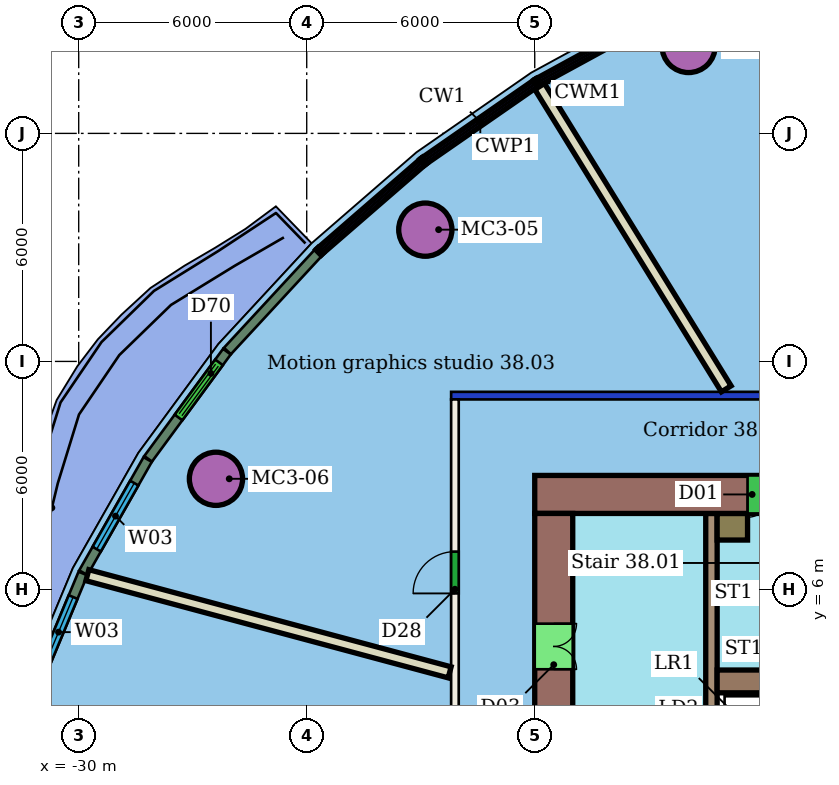
"""IFC4 building model, lengths in metres.
Left out: names, types, materials, properties, quantities, classifications, styles, units other than length and angle.
Written with IfcOpenShell. Run it as: python <this file> out.ifc"""

import sys

from ifc_helpers import new_model, si_unit, direction, frame, frame_2d, origin, origin_2d, place, context, subcontext, project, spatial, rectangle, hollow_circle, extrude, element, fill, save


model = new_model("IFC4")
c1 = context("Model", 3, precision=1e-05, world=origin(), true_north=direction((0.0, 1.0)))
c2 = subcontext(c1, "Body", "Model", "MODEL_VIEW")
j1 = project(units=[si_unit("LENGTHUNIT", "METRE"), si_unit("PLANEANGLEUNIT", "RADIAN")], contexts=[c1])
p1 = place(None, origin())
s1 = spatial("IfcSite", under=j1, at=p1, CompositionType="ELEMENT")
p2 = place(p1, origin())
s2 = spatial("IfcBuilding", under=s1, at=p2, CompositionType="ELEMENT")
p3 = place(p2, frame((0.0, 0.0, 161.4)))
s3 = spatial("IfcBuildingStorey", under=s2, at=p3, CompositionType="ELEMENT", Elevation=161.4)
for number, where, z_axis, x_axis in (
    (1, (-13.952, 20.301, 0.0), (0.0, 0.0, 1.0), (1.0, 0.0, 0.0)),
    (2, (-20.879, 15.467, 0.0), (0.0, 0.0, 1.0), (1.0, 0.0, 0.0)),
    (3, (-26.388, 8.912, 0.0), (0.0, 0.0, 1.0), (1.0, 0.0, 0.0)),
):
    element("IfcColumn", number, at=place(p3, frame(where, z_axis=z_axis, x_axis=x_axis)), inside=s3, PredefinedType="COLUMN", context=c2, shape_type="SweptSolid", body=[
        extrude(hollow_circle(Radius=0.7, WallThickness=0.05, at=origin_2d()), origin(), (0.0, 0.0, 1.0), 3.45),
    ])
p4 = place(p3, frame((-20.1, -11.0, 0.0), z_axis=(0.0, 0.0, 1.0), x_axis=(0.0, 1.0, 0.0)))
e4 = element("IfcWall", 4, at=p4, inside=s3, PredefinedType="PARTITIONING", context=c2, shape_type="SweptSolid", body=[
    extrude(rectangle(XDim=22.0, YDim=0.2, at=frame_2d((11.0, 0.0))), origin(), (0.0, 0.0, 1.0), 3.45),
])
p5 = place(p4, frame((16.896, 0.0, 0.0)))
e5 = element("IfcOpeningElement", 5, at=p5, cuts=e4, PredefinedType="OPENING", context=c2, shape_type="SweptSolid", body=[
    extrude(rectangle(XDim=1.1, YDim=2.1, at=frame_2d((0.55, 1.05))), frame((0.0, 0.11, 0.0), z_axis=(0.0, -1.0, 0.0), x_axis=(1.0, 0.0, 0.0)), (0.0, 0.0, 1.0), 0.22),
])
p6 = place(p4, frame((10.168, 0.0, 0.0)))
e6 = element("IfcOpeningElement", 6, at=p6, cuts=e4, PredefinedType="OPENING", context=c2, shape_type="SweptSolid", body=[
    extrude(rectangle(XDim=1.8, YDim=2.1, at=frame_2d((0.9, 1.05))), frame((0.0, 0.11, 0.0), z_axis=(0.0, -1.0, 0.0), x_axis=(1.0, 0.0, 0.0)), (0.0, 0.0, 1.0), 0.22),
])
p7 = place(p3, frame((-20.2, 11.1, 0.0), z_axis=(0.0, 0.0, 1.0), x_axis=(1.0, 0.0, 0.0)))
e7 = element("IfcWall", 7, at=p7, inside=s3, PredefinedType="PARTITIONING", context=c2, shape_type="SweptSolid", body=[
    extrude(rectangle(XDim=28.4, YDim=0.2, at=frame_2d((14.2, 0.0))), origin(), (0.0, 0.0, 1.0), 3.05),
])
p8 = place(p7, frame((20.771, 0.0, 0.0)))
e8 = element("IfcOpeningElement", 8, at=p8, cuts=e7, PredefinedType="OPENING", context=c2, shape_type="SweptSolid", body=[
    extrude(rectangle(XDim=0.9, YDim=2.1, at=frame_2d((0.45, 1.05))), frame((0.0, 0.11, 0.0), z_axis=(0.0, -1.0, 0.0), x_axis=(1.0, 0.0, 0.0)), (0.0, 0.0, 1.0), 0.22),
])
p9 = place(p7, frame((14.548, 0.0, 0.0)))
e9 = element("IfcOpeningElement", 9, at=p9, cuts=e7, PredefinedType="OPENING", context=c2, shape_type="SweptSolid", body=[
    extrude(rectangle(XDim=1.8, YDim=2.1, at=frame_2d((0.9, 1.05))), frame((0.0, 0.11, 0.0), z_axis=(0.0, -1.0, 0.0), x_axis=(1.0, 0.0, 0.0)), (0.0, 0.0, 1.0), 0.22),
])
p10 = place(p3, frame((-17.871, 19.235, 0.0), z_axis=(0.0, 0.0, 1.0), x_axis=(0.525169292987, -0.850997775381, 0.0)))
e10 = element("IfcWall", 10, at=p10, inside=s3, PredefinedType="PARTITIONING", context=c2, shape_type="SweptSolid", body=[
    extrude(rectangle(XDim=9.35, YDim=0.3, at=frame_2d((4.675, 0.0))), origin(), (0.0, 0.0, 1.0), 3.45),
])
p11 = place(p3, frame((-29.772, 6.375, 0.0), z_axis=(0.0, 0.0, 1.0), x_axis=(0.965867747251, -0.259035701826, 0.0)))
e11 = element("IfcWall", 11, at=p11, inside=s3, PredefinedType="PARTITIONING", context=c2, shape_type="SweptSolid", body=[
    extrude(rectangle(XDim=9.87, YDim=0.3, at=frame_2d((4.935, 0.0))), origin(), (0.0, 0.0, 1.0), 3.45),
])
p12 = place(p3, frame((-23.7, 14.854, 0.0), z_axis=(0.0, 0.0, 1.0), x_axis=(-0.679128099516, -0.734019771156, 0.0)))
e12 = element("IfcWall", 12, at=p12, inside=s3, PredefinedType="SOLIDWALL", context=c2, shape_type="SweptSolid", body=[
    extrude(rectangle(XDim=3.514, YDim=0.25, at=frame_2d((1.757, 0.0))), origin(), (0.0, 0.0, 1.0), 3.1),
])
p13 = place(p3, frame((-26.101, 12.257, 0.0), z_axis=(0.0, 0.0, 1.0), x_axis=(-0.592246582395, -0.805756778216, 0.0)))
e13 = element("IfcWall", 13, at=p13, inside=s3, PredefinedType="SOLIDWALL", context=c2, shape_type="SweptSolid", body=[
    extrude(rectangle(XDim=3.499, YDim=0.25, at=frame_2d((1.75, 0.0))), origin(), (0.0, 0.0, 1.0), 3.1),
])
p14 = place(p13, frame((0.35, 0.0, 0.0)))
e14 = element("IfcOpeningElement", 14, at=p14, cuts=e13, PredefinedType="OPENING", context=c2, shape_type="SweptSolid", body=[
    extrude(rectangle(XDim=1.8, YDim=2.4, at=frame_2d((0.9, 1.2))), frame((0.0, 0.135, 0.0), z_axis=(0.0, -1.0, 0.0), x_axis=(1.0, 0.0, 0.0)), (0.0, 0.0, 1.0), 0.27),
])
p15 = place(p3, frame((-28.185, 9.419, 0.0), z_axis=(0.0, 0.0, 1.0), x_axis=(-0.494211413801, -0.869341750101, 0.0)))
e15 = element("IfcWall", 15, at=p15, inside=s3, PredefinedType="SOLIDWALL", context=c2, shape_type="SweptSolid", body=[
    extrude(rectangle(XDim=3.426, YDim=0.25, at=frame_2d((1.713, 0.0))), origin(), (0.0, 0.0, 1.0), 3.1),
])
p16 = place(p15, frame((0.713, 0.0, 0.9)))
e16 = element("IfcOpeningElement", 16, at=p16, cuts=e15, PredefinedType="OPENING", context=c2, shape_type="SweptSolid", body=[
    extrude(rectangle(XDim=2.0, YDim=2.1, at=frame_2d((1.0, 1.05))), frame((0.0, 0.135, 0.0), z_axis=(0.0, -1.0, 0.0), x_axis=(1.0, 0.0, 0.0)), (0.0, 0.0, 1.0), 0.27),
])
p17 = place(p3, frame((-29.888, 6.42, 0.0), z_axis=(0.0, 0.0, 1.0), x_axis=(-0.38458945082, -0.923087728397, 0.0)))
e17 = element("IfcWall", 17, at=p17, inside=s3, PredefinedType="SOLIDWALL", context=c2, shape_type="SweptSolid", body=[
    extrude(rectangle(XDim=3.342, YDim=0.25, at=frame_2d((1.671, 0.0))), origin(), (0.0, 0.0, 1.0), 3.1),
])
p18 = place(p17, frame((0.671, 0.0, 0.9)))
e18 = element("IfcOpeningElement", 18, at=p18, cuts=e17, PredefinedType="OPENING", context=c2, shape_type="SweptSolid", body=[
    extrude(rectangle(XDim=2.0, YDim=2.1, at=frame_2d((1.0, 1.05))), frame((0.0, 0.135, 0.0), z_axis=(0.0, -1.0, 0.0), x_axis=(1.0, 0.0, 0.0)), (0.0, 0.0, 1.0), 0.27),
])
p19 = place(p3, frame((-6.0, 8.5, 0.0), z_axis=(0.0, 0.0, 1.0), x_axis=(-1.0, 0.0, 0.0)))
e19 = element("IfcWall", 19, at=p19, inside=s3, PredefinedType="SHEAR", context=c2, shape_type="SweptSolid", body=[
    extrude(rectangle(XDim=12.0, YDim=1.0, at=frame_2d((6.0, 0.0))), origin(), (0.0, 0.0, 1.0), 3.3),
])
p20 = place(p19, frame((5.2, 0.0, 0.0)))
e20 = element("IfcOpeningElement", 20, at=p20, cuts=e19, PredefinedType="OPENING", context=c2, shape_type="SweptSolid", body=[
    extrude(rectangle(XDim=1.2, YDim=2.1, at=frame_2d((0.6, 1.05))), frame((0.0, 0.51, 0.0), z_axis=(0.0, -1.0, 0.0), x_axis=(1.0, 0.0, 0.0)), (0.0, 0.0, 1.0), 1.02),
])
p21 = place(p3, frame((-17.5, 8.0, 0.0), z_axis=(0.0, 0.0, 1.0), x_axis=(0.0, -1.0, 0.0)))
e21 = element("IfcWall", 21, at=p21, inside=s3, PredefinedType="SHEAR", context=c2, shape_type="SweptSolid", body=[
    extrude(rectangle(XDim=16.0, YDim=1.0, at=frame_2d((8.0, 0.0))), origin(), (0.0, 0.0, 1.0), 3.3),
])
p22 = place(p21, frame((11.9, 0.0, 0.0)))
e22 = element("IfcOpeningElement", 22, at=p22, cuts=e21, PredefinedType="OPENING", context=c2, shape_type="SweptSolid", body=[
    extrude(rectangle(XDim=1.2, YDim=2.1, at=frame_2d((0.6, 1.05))), frame((0.0, 0.51, 0.0), z_axis=(0.0, -1.0, 0.0), x_axis=(1.0, 0.0, 0.0)), (0.0, 0.0, 1.0), 1.02),
])
p23 = place(p21, frame((2.9, 0.0, 0.0)))
e23 = element("IfcOpeningElement", 23, at=p23, cuts=e21, PredefinedType="OPENING", context=c2, shape_type="SweptSolid", body=[
    extrude(rectangle(XDim=1.2, YDim=2.1, at=frame_2d((0.6, 1.05))), frame((0.0, 0.51, 0.0), z_axis=(0.0, -1.0, 0.0), x_axis=(1.0, 0.0, 0.0)), (0.0, 0.0, 1.0), 1.02),
])
p24 = place(p3, frame((-13.2, 3.58, 0.0), z_axis=(0.0, 0.0, 1.0), x_axis=(1.0, 0.0, 0.0)))
e24 = element("IfcWall", 24, at=p24, inside=s3, PredefinedType="SHEAR", context=c2, shape_type="SweptSolid", body=[
    extrude(rectangle(XDim=7.2, YDim=0.6, at=frame_2d((3.6, 0.0))), origin(), (0.0, 0.0, 1.0), 3.3),
])
p25 = place(p3, frame((-13.35, 8.0, 0.0), z_axis=(0.0, 0.0, 1.0), x_axis=(0.0, -1.0, 0.0)))
e25 = element("IfcWall", 25, at=p25, inside=s3, PredefinedType="SHEAR", context=c2, shape_type="SweptSolid", body=[
    extrude(rectangle(XDim=16.0, YDim=0.3, at=frame_2d((8.0, 0.0))), origin(), (0.0, 0.0, 1.0), 3.3),
])
p26 = place(p25, frame((7.25, 0.0, 0.0)))
e26 = element("IfcOpeningElement", 26, at=p26, cuts=e25, PredefinedType="OPENING", context=c2, shape_type="SweptSolid", body=[
    extrude(rectangle(XDim=1.5, YDim=2.1, at=frame_2d((0.75, 1.05))), frame((0.0, 0.16, 0.0), z_axis=(0.0, -1.0, 0.0), x_axis=(1.0, 0.0, 0.0)), (0.0, 0.0, 1.0), 0.32),
])
p27 = place(p3, frame((-13.2, 7.65, 0.0), z_axis=(0.0, 0.0, 1.0), x_axis=(1.0, 0.0, 0.0)))
e27 = element("IfcWall", 27, at=p27, inside=s3, PredefinedType="SHEAR", context=c2, shape_type="SweptSolid", body=[
    extrude(rectangle(XDim=0.8, YDim=0.7, at=frame_2d((0.4, 0.0))), origin(), (0.0, 0.0, 1.0), 3.3),
])
p28 = place(p5, origin())
e28 = element("IfcDoor", 28, at=p28, inside=s3, OperationType="SINGLE_SWING_LEFT", PredefinedType="DOOR", context=c2, shape_type="SweptSolid", body=[
    extrude(rectangle(XDim=1.1, YDim=2.1, at=frame_2d((0.55, 1.05))), frame((0.0, 0.025, 0.0), z_axis=(0.0, -1.0, 0.0), x_axis=(1.0, 0.0, 0.0)), (0.0, 0.0, 1.0), 0.05),
])
fill(e5, e28)
p29 = place(p14, origin())
e29 = element("IfcDoor", 29, at=p29, inside=s3, OperationType="DOUBLE_DOOR_SLIDING", PredefinedType="DOOR", context=c2, shape_type="SweptSolid", body=[
    extrude(rectangle(XDim=1.8, YDim=2.4, at=frame_2d((0.9, 1.2))), frame((0.0, 0.025, 0.0), z_axis=(0.0, -1.0, 0.0), x_axis=(1.0, 0.0, 0.0)), (0.0, 0.0, 1.0), 0.05),
])
fill(e14, e29)
p30 = place(p16, origin())
e30 = element("IfcWindow", 30, at=p30, inside=s3, PartitioningType="SINGLE_PANEL", PredefinedType="WINDOW", context=c2, shape_type="SweptSolid", body=[
    extrude(rectangle(XDim=2.0, YDim=2.1, at=frame_2d((1.0, 1.05))), frame((0.0, 0.03, 0.0), z_axis=(0.0, -1.0, 0.0), x_axis=(1.0, 0.0, 0.0)), (0.0, 0.0, 1.0), 0.06),
])
fill(e16, e30)
p31 = place(p18, origin())
e31 = element("IfcWindow", 31, at=p31, inside=s3, PartitioningType="SINGLE_PANEL", PredefinedType="WINDOW", context=c2, shape_type="SweptSolid", body=[
    extrude(rectangle(XDim=2.0, YDim=2.1, at=frame_2d((1.0, 1.05))), frame((0.0, 0.03, 0.0), z_axis=(0.0, -1.0, 0.0), x_axis=(1.0, 0.0, 0.0)), (0.0, 0.0, 1.0), 0.06),
])
fill(e18, e31)
p32 = place(p20, origin())
e32 = element("IfcDoor", 32, at=p32, inside=s3, OperationType="DOUBLE_DOOR_SINGLE_SWING", PredefinedType="NOTDEFINED", context=c2, shape_type="SweptSolid", body=[
    extrude(rectangle(XDim=1.2, YDim=2.1, at=frame_2d((0.6, 1.05))), frame((0.0, 0.025, 0.0), z_axis=(0.0, -1.0, 0.0), x_axis=(1.0, 0.0, 0.0)), (0.0, 0.0, 1.0), 0.05),
])
fill(e20, e32)
p33 = place(p23, origin())
e33 = element("IfcDoor", 33, at=p33, inside=s3, OperationType="DOUBLE_DOOR_SINGLE_SWING", PredefinedType="NOTDEFINED", context=c2, shape_type="SweptSolid", body=[
    extrude(rectangle(XDim=1.2, YDim=2.1, at=frame_2d((0.6, 1.05))), frame((0.0, 0.025, 0.0), z_axis=(0.0, -1.0, 0.0), x_axis=(1.0, 0.0, 0.0)), (0.0, 0.0, 1.0), 0.05),
])
fill(e23, e33)
save(model, sys.argv[1])
